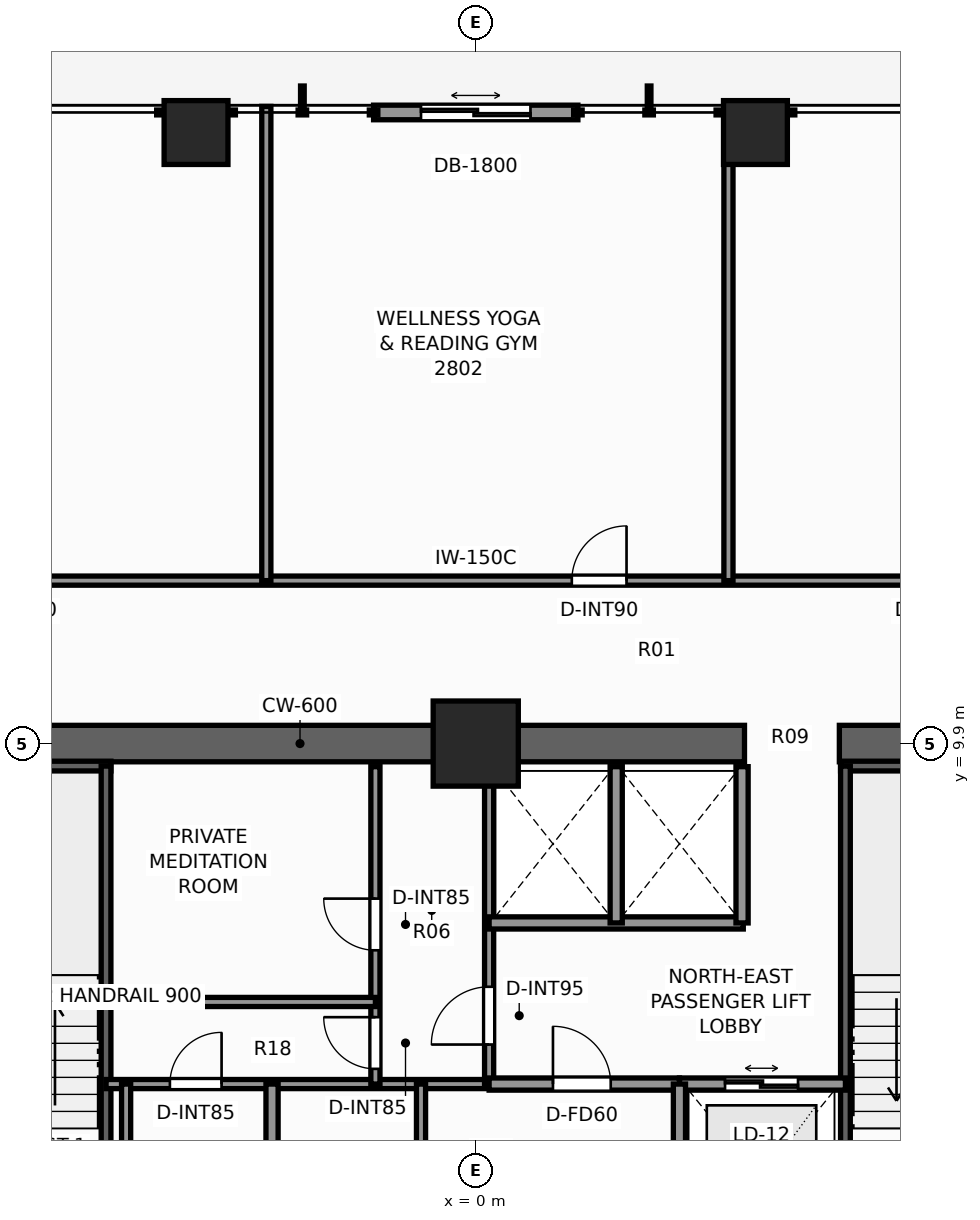
"""IFC4 building model, lengths in metres.
Left out: names, types, materials, properties, quantities, classifications, styles, units other than length and angle.
Written with IfcOpenShell. Run it as: python <this file> out.ifc"""

import sys

from ifc_helpers import new_model, si_unit, direction, frame, frame_2d, origin, origin_2d, place, context, subcontext, project, spatial, rectangle, extrude, element, fill, save


model = new_model("IFC4")
c1 = context("Model", 3, precision=1e-05, world=origin(), true_north=direction((0.0, 1.0)))
c2 = subcontext(c1, "Body", "Model", "MODEL_VIEW")
j1 = project(units=[si_unit("LENGTHUNIT", "METRE"), si_unit("PLANEANGLEUNIT", "RADIAN")], contexts=[c1])
p1 = place(None, origin())
s1 = spatial("IfcSite", under=j1, at=p1, CompositionType="ELEMENT")
p2 = place(p1, origin())
s2 = spatial("IfcBuilding", under=s1, at=p2, CompositionType="ELEMENT")
p3 = place(p2, frame((0.0, 0.0, 98.6)))
s3 = spatial("IfcBuildingStorey", under=s2, at=p3, CompositionType="ELEMENT", Elevation=98.6)
p4 = place(p3, frame((-10.2, 9.9, 0.0), z_axis=(0.0, 0.0, 1.0), x_axis=(1.0, 0.0, 0.0)))
e1 = element("IfcWall", 1, at=p4, inside=s3, PredefinedType="SHEAR", context=c2, shape_type="SweptSolid", body=[
    extrude(rectangle(XDim=14.62, YDim=0.6, at=frame_2d((7.31, 0.0))), origin(), (0.0, 0.0, 1.0), 3.3),
])
p5 = place(p3, frame((5.98, 9.9, 0.0), z_axis=(0.0, 0.0, 1.0), x_axis=(1.0, 0.0, 0.0)))
e2 = element("IfcWall", 2, at=p5, inside=s3, PredefinedType="SHEAR", context=c2, shape_type="SweptSolid", body=[
    extrude(rectangle(XDim=4.22, YDim=0.6, at=frame_2d((2.11, 0.0))), origin(), (0.0, 0.0, 1.0), 3.3),
])
p6 = place(p3, frame((0.0, 9.9, 0.0), z_axis=(0.0, 0.0, 1.0), x_axis=(1.0, 0.0, 0.0)))
e3 = element("IfcColumn", 3, at=p6, inside=s3, PredefinedType="COLUMN", context=c2, shape_type="SweptSolid", body=[
    extrude(rectangle(XDim=1.4, YDim=1.4, at=origin_2d()), origin(), (0.0, 0.0, 1.0), 3.3),
])
for number, where, z_axis, x_axis in (
    (4, (-4.6, 19.95, 0.0), (0.0, 0.0, 1.0), (1.0, 0.0, 0.0)),
    (5, (4.6, 19.95, 0.0), (0.0, 0.0, 1.0), (1.0, 0.0, 0.0)),
):
    element("IfcColumn", number, at=place(p3, frame(where, z_axis=z_axis, x_axis=x_axis)), inside=s3, PredefinedType="COLUMN", context=c2, shape_type="SweptSolid", body=[
        extrude(rectangle(XDim=1.05, YDim=1.05, at=origin_2d()), origin(), (0.0, 0.0, 1.0), 3.3),
    ])
p7 = place(p3, frame((-1.68, 20.28, 0.0), z_axis=(0.0, 0.0, 1.0), x_axis=(1.0, 0.0, 0.0)))
e6 = element("IfcWall", 6, at=p7, inside=s3, PredefinedType="STANDARD", context=c2, shape_type="SweptSolid", body=[
    extrude(rectangle(XDim=3.36, YDim=0.24, at=frame_2d((1.68, 0.0))), origin(), (0.0, 0.0, 1.0), 3.08),
])
p8 = place(p7, frame((0.78, 0.0, 0.0)))
e7 = element("IfcOpeningElement", 7, at=p8, cuts=e6, PredefinedType="OPENING", context=c2, shape_type="SweptSolid", body=[
    extrude(rectangle(XDim=1.8, YDim=2.2, at=frame_2d((0.9, 1.1))), frame((0.0, 0.13, 0.0), z_axis=(0.0, -1.0, 0.0), x_axis=(1.0, 0.0, 0.0)), (0.0, 0.0, 1.0), 0.26),
])
p9 = place(p3, frame((-9.52, 9.53, 0.0), z_axis=(0.0, 0.0, 1.0), x_axis=(1.0, 0.0, 0.0)))
e8 = element("IfcWall", 8, at=p9, inside=s3, PredefinedType="SHEAR", context=c2, shape_type="SweptSolid", body=[
    extrude(rectangle(XDim=3.52, YDim=0.16, at=frame_2d((1.76, 0.0))), origin(), (0.0, 0.0, 1.0), 3.3),
])
p10 = place(p3, frame((-6.08, 1.97, 0.0), z_axis=(0.0, 0.0, 1.0), x_axis=(0.0, 1.0, 0.0)))
e9 = element("IfcWall", 9, at=p10, inside=s3, PredefinedType="SHEAR", context=c2, shape_type="SweptSolid", body=[
    extrude(rectangle(XDim=7.56, YDim=0.16, at=frame_2d((3.78, 0.0))), origin(), (0.0, 0.0, 1.0), 3.3),
])
p11 = place(p3, frame((6.0, 9.53, 0.0), z_axis=(0.0, 0.0, 1.0), x_axis=(1.0, 0.0, 0.0)))
e10 = element("IfcWall", 10, at=p11, inside=s3, PredefinedType="SHEAR", context=c2, shape_type="SweptSolid", body=[
    extrude(rectangle(XDim=3.52, YDim=0.16, at=frame_2d((1.76, 0.0))), origin(), (0.0, 0.0, 1.0), 3.3),
])
p12 = place(p3, frame((6.08, 1.97, 0.0), z_axis=(0.0, 0.0, 1.0), x_axis=(0.0, 1.0, 0.0)))
e11 = element("IfcWall", 11, at=p12, inside=s3, PredefinedType="SHEAR", context=c2, shape_type="SweptSolid", body=[
    extrude(rectangle(XDim=7.56, YDim=0.16, at=frame_2d((3.78, 0.0))), origin(), (0.0, 0.0, 1.0), 3.3),
])
p13 = place(p3, frame((3.35, 4.3, 0.0), z_axis=(0.0, 0.0, 1.0), x_axis=(1.0, 0.0, 0.0)))
e12 = element("IfcWall", 12, at=p13, inside=s3, PredefinedType="SOLIDWALL", context=c2, shape_type="SweptSolid", body=[
    extrude(rectangle(XDim=2.73, YDim=0.2, at=frame_2d((1.365, 0.0))), origin(), (0.0, 0.0, 1.0), 3.08),
])
p14 = place(p13, frame((0.75, 0.0, 0.0)))
e13 = element("IfcOpeningElement", 13, at=p14, cuts=e12, PredefinedType="OPENING", context=c2, shape_type="SweptSolid", body=[
    extrude(rectangle(XDim=1.2, YDim=2.25, at=frame_2d((0.6, 1.125))), frame((0.0, 0.11, 0.0), z_axis=(0.0, -1.0, 0.0), x_axis=(1.0, 0.0, 0.0)), (0.0, 0.0, 1.0), 0.22),
])
p15 = place(p3, frame((-6.08, 4.3, 0.0), z_axis=(0.0, 0.0, 1.0), x_axis=(1.0, 0.0, 0.0)))
e14 = element("IfcWall", 14, at=p15, inside=s3, PredefinedType="PARTITIONING", context=c2, shape_type="SweptSolid", body=[
    extrude(rectangle(XDim=6.3, YDim=0.15, at=frame_2d((3.15, 0.0))), origin(), (0.0, 0.0, 1.0), 3.08),
])
p16 = place(p15, frame((1.05, 0.0, 0.0)))
e15 = element("IfcOpeningElement", 15, at=p16, cuts=e14, PredefinedType="OPENING", context=c2, shape_type="SweptSolid", body=[
    extrude(rectangle(XDim=0.85, YDim=2.03, at=frame_2d((0.425, 1.015))), frame((0.0, 0.085, 0.0), z_axis=(0.0, -1.0, 0.0), x_axis=(1.0, 0.0, 0.0)), (0.0, 0.0, 1.0), 0.17),
])
p17 = place(p3, frame((0.22, 4.3, 0.0), z_axis=(0.0, 0.0, 1.0), x_axis=(0.0, 1.0, 0.0)))
e16 = element("IfcWall", 16, at=p17, inside=s3, PredefinedType="PARTITIONING", context=c2, shape_type="SweptSolid", body=[
    extrude(rectangle(XDim=5.22, YDim=0.15, at=frame_2d((2.61, 0.0))), origin(), (0.0, 0.0, 1.0), 3.08),
])
p18 = place(p17, frame((0.65, 0.0, 0.0)))
e17 = element("IfcOpeningElement", 17, at=p18, cuts=e16, PredefinedType="OPENING", context=c2, shape_type="SweptSolid", body=[
    extrude(rectangle(XDim=0.95, YDim=2.06, at=frame_2d((0.475, 1.03))), frame((0.0, 0.085, 0.0), z_axis=(0.0, -1.0, 0.0), x_axis=(1.0, 0.0, 0.0)), (0.0, 0.0, 1.0), 0.17),
])
p19 = place(p3, frame((-1.65, 4.3, 0.0), z_axis=(0.0, 0.0, 1.0), x_axis=(0.0, 1.0, 0.0)))
e18 = element("IfcWall", 18, at=p19, inside=s3, PredefinedType="PARTITIONING", context=c2, shape_type="SweptSolid", body=[
    extrude(rectangle(XDim=5.22, YDim=0.15, at=frame_2d((2.61, 0.0))), origin(), (0.0, 0.0, 1.0), 3.08),
])
p20 = place(p19, frame((2.2, 0.0, 0.0)))
e19 = element("IfcOpeningElement", 19, at=p20, cuts=e18, PredefinedType="OPENING", context=c2, shape_type="SweptSolid", body=[
    extrude(rectangle(XDim=0.85, YDim=2.03, at=frame_2d((0.425, 1.015))), frame((0.0, 0.085, 0.0), z_axis=(0.0, -1.0, 0.0), x_axis=(1.0, 0.0, 0.0)), (0.0, 0.0, 1.0), 0.17),
])
p21 = place(p19, frame((0.25, 0.0, 0.0)))
e20 = element("IfcOpeningElement", 20, at=p21, cuts=e18, PredefinedType="OPENING", context=c2, shape_type="SweptSolid", body=[
    extrude(rectangle(XDim=0.85, YDim=2.03, at=frame_2d((0.425, 1.015))), frame((0.0, 0.085, 0.0), z_axis=(0.0, -1.0, 0.0), x_axis=(1.0, 0.0, 0.0)), (0.0, 0.0, 1.0), 0.17),
])
p22 = place(p3, frame((-6.08, 5.65, 0.0), z_axis=(0.0, 0.0, 1.0), x_axis=(1.0, 0.0, 0.0)))
e21 = element("IfcWall", 21, at=p22, inside=s3, PredefinedType="PARTITIONING", context=c2, shape_type="SweptSolid", body=[
    extrude(rectangle(XDim=4.43, YDim=0.15, at=frame_2d((2.215, 0.0))), origin(), (0.0, 0.0, 1.0), 3.08),
])
p23 = place(p3, frame((0.22, 6.95, 0.0), z_axis=(0.0, 0.0, 1.0), x_axis=(1.0, 0.0, 0.0)))
e22 = element("IfcWall", 22, at=p23, inside=s3, PredefinedType="SOLIDWALL", context=c2, shape_type="SweptSolid", body=[
    extrude(rectangle(XDim=4.18, YDim=0.2, at=frame_2d((2.09, 0.0))), origin(), (0.0, 0.0, 1.0), 3.08),
])
for number, where, z_axis, x_axis in (
    (23, (4.38, 6.95, 0.0), (0.0, 0.0, 1.0), (0.0, 1.0, 0.0)),
    (24, (2.31, 6.95, 0.0), (0.0, 0.0, 1.0), (0.0, 1.0, 0.0)),
):
    element("IfcWall", number, at=place(p3, frame(where, z_axis=z_axis, x_axis=x_axis)), inside=s3, PredefinedType="SOLIDWALL", context=c2, shape_type="SweptSolid", body=[
        extrude(rectangle(XDim=2.57, YDim=0.2, at=frame_2d((1.285, 0.0))), origin(), (0.0, 0.0, 1.0), 3.08),
    ])
p24 = place(p3, frame((0.22, 4.3, 0.0), z_axis=(0.0, 0.0, 1.0), x_axis=(1.0, 0.0, 0.0)))
e25 = element("IfcWall", 25, at=p24, inside=s3, PredefinedType="SOLIDWALL", context=c2, shape_type="SweptSolid", body=[
    extrude(rectangle(XDim=3.13, YDim=0.2, at=frame_2d((1.565, 0.0))), origin(), (0.0, 0.0, 1.0), 3.08),
])
p25 = place(p24, frame((1.05, 0.0, 0.0)))
e26 = element("IfcOpeningElement", 26, at=p25, cuts=e25, PredefinedType="OPENING", context=c2, shape_type="SweptSolid", body=[
    extrude(rectangle(XDim=0.95, YDim=2.06, at=frame_2d((0.475, 1.03))), frame((0.0, 0.11, 0.0), z_axis=(0.0, -1.0, 0.0), x_axis=(1.0, 0.0, 0.0)), (0.0, 0.0, 1.0), 0.22),
])
for number, where, z_axis, x_axis in (
    (27, (-3.35, 1.1, 0.0), (0.0, 0.0, 1.0), (0.0, 1.0, 0.0)),
    (28, (3.35, 1.1, 0.0), (0.0, 0.0, 1.0), (0.0, 1.0, 0.0)),
):
    element("IfcWall", number, at=place(p3, frame(where, z_axis=z_axis, x_axis=x_axis)), inside=s3, PredefinedType="SOLIDWALL", context=c2, shape_type="SweptSolid", body=[
        extrude(rectangle(XDim=3.2, YDim=0.2, at=frame_2d((1.6, 0.0))), origin(), (0.0, 0.0, 1.0), 3.08),
    ])
p26 = place(p3, frame((-0.9, 1.05, 0.0), z_axis=(0.0, 0.0, 1.0), x_axis=(0.0, 1.0, 0.0)))
e29 = element("IfcWall", 29, at=p26, inside=s3, PredefinedType="PARTITIONING", context=c2, shape_type="SweptSolid", body=[
    extrude(rectangle(XDim=3.25, YDim=0.15, at=frame_2d((1.625, 0.0))), origin(), (0.0, 0.0, 1.0), 3.08),
])
p27 = place(p26, frame((1.1, 0.0, 0.0)))
e30 = element("IfcOpeningElement", 30, at=p27, cuts=e29, PredefinedType="OPENING", context=c2, shape_type="SweptSolid", body=[
    extrude(rectangle(XDim=0.85, YDim=2.03, at=frame_2d((0.425, 1.015))), frame((0.0, 0.085, 0.0), z_axis=(0.0, -1.0, 0.0), x_axis=(1.0, 0.0, 0.0)), (0.0, 0.0, 1.0), 0.17),
])
p28 = place(p3, frame((-5.75, 1.97, 0.0), z_axis=(0.0, 0.0, 1.0), x_axis=(0.0, 1.0, 0.0)))
e31 = element("IfcWall", 31, at=p28, inside=s3, PredefinedType="PARTITIONING", context=c2, shape_type="SweptSolid", body=[
    extrude(rectangle(XDim=2.33, YDim=0.15, at=frame_2d((1.165, 0.0))), origin(), (0.0, 0.0, 1.0), 3.08),
])
p29 = place(p3, frame((-12.26, 12.58, 0.0), z_axis=(0.0, 0.0, 1.0), x_axis=(1.0, 0.0, 0.0)))
e32 = element("IfcWall", 32, at=p29, inside=s3, PredefinedType="PARTITIONING", context=c2, shape_type="SweptSolid", body=[
    extrude(rectangle(XDim=24.52, YDim=0.15, at=frame_2d((12.26, 0.0))), origin(), (0.0, 0.0, 1.0), 2.292),
])
p30 = place(p29, frame((4.275, 0.0, 0.0)))
e33 = element("IfcOpeningElement", 33, at=p30, cuts=e32, PredefinedType="OPENING", context=c2, shape_type="SweptSolid", body=[
    extrude(rectangle(XDim=0.9, YDim=2.06, at=frame_2d((0.45, 1.03))), frame((0.0, 0.085, 0.0), z_axis=(0.0, -1.0, 0.0), x_axis=(1.0, 0.0, 0.0)), (0.0, 0.0, 1.0), 0.17),
])
p31 = place(p29, frame((13.84, 0.0, 0.0)))
e34 = element("IfcOpeningElement", 34, at=p31, cuts=e32, PredefinedType="OPENING", context=c2, shape_type="SweptSolid", body=[
    extrude(rectangle(XDim=0.9, YDim=2.06, at=frame_2d((0.45, 1.03))), frame((0.0, 0.085, 0.0), z_axis=(0.0, -1.0, 0.0), x_axis=(1.0, 0.0, 0.0)), (0.0, 0.0, 1.0), 0.17),
])
p32 = place(p29, frame((19.345, 0.0, 0.0)))
e35 = element("IfcOpeningElement", 35, at=p32, cuts=e32, PredefinedType="OPENING", context=c2, shape_type="SweptSolid", body=[
    extrude(rectangle(XDim=0.9, YDim=2.06, at=frame_2d((0.45, 1.03))), frame((0.0, 0.085, 0.0), z_axis=(0.0, -1.0, 0.0), x_axis=(1.0, 0.0, 0.0)), (0.0, 0.0, 1.0), 0.17),
])
for number, where, z_axis, x_axis in (
    (36, (-3.444, 12.58, 0.0), (0.0, 0.0, 1.0), (0.0, 1.0, 0.0)),
    (37, (4.156, 12.58, 0.0), (0.0, 0.0, 1.0), (0.0, 1.0, 0.0)),
):
    element("IfcWall", number, at=place(p3, frame(where, z_axis=z_axis, x_axis=x_axis)), inside=s3, PredefinedType="PARTITIONING", context=c2, shape_type="SweptSolid", body=[
        extrude(rectangle(XDim=7.8, YDim=0.15, at=frame_2d((3.9, 0.0))), origin(), (0.0, 0.0, 1.0), 2.449),
    ])
p33 = place(p8, origin())
e38 = element("IfcDoor", 38, at=p33, inside=s3, OperationType="DOUBLE_DOOR_SLIDING", PredefinedType="DOOR", context=c2, shape_type="SweptSolid", body=[
    extrude(rectangle(XDim=1.8, YDim=2.2, at=frame_2d((0.9, 1.1))), frame((0.0, 0.025, 0.0), z_axis=(0.0, -1.0, 0.0), x_axis=(1.0, 0.0, 0.0)), (0.0, 0.0, 1.0), 0.05),
])
fill(e7, e38)
p34 = place(p14, origin())
e39 = element("IfcDoor", 39, at=p34, inside=s3, OperationType="DOUBLE_DOOR_SLIDING", PredefinedType="DOOR", context=c2, shape_type="SweptSolid", body=[
    extrude(rectangle(XDim=1.2, YDim=2.25, at=frame_2d((0.6, 1.125))), frame((0.0, 0.025, 0.0), z_axis=(0.0, -1.0, 0.0), x_axis=(1.0, 0.0, 0.0)), (0.0, 0.0, 1.0), 0.05),
])
fill(e13, e39)
p35 = place(p18, origin())
e40 = element("IfcDoor", 40, at=p35, inside=s3, OperationType="SINGLE_SWING_LEFT", PredefinedType="DOOR", context=c2, shape_type="SweptSolid", body=[
    extrude(rectangle(XDim=0.95, YDim=2.06, at=frame_2d((0.475, 1.03))), frame((0.0, 0.025, 0.0), z_axis=(0.0, -1.0, 0.0), x_axis=(1.0, 0.0, 0.0)), (0.0, 0.0, 1.0), 0.05),
])
fill(e17, e40)
p36 = place(p20, origin())
e41 = element("IfcDoor", 41, at=p36, inside=s3, OperationType="SINGLE_SWING_RIGHT", PredefinedType="DOOR", context=c2, shape_type="SweptSolid", body=[
    extrude(rectangle(XDim=0.85, YDim=2.03, at=frame_2d((0.425, 1.015))), frame((0.0, 0.025, 0.0), z_axis=(0.0, -1.0, 0.0), x_axis=(1.0, 0.0, 0.0)), (0.0, 0.0, 1.0), 0.05),
])
fill(e19, e41)
p37 = place(p21, origin())
e42 = element("IfcDoor", 42, at=p37, inside=s3, OperationType="SINGLE_SWING_RIGHT", PredefinedType="DOOR", context=c2, shape_type="SweptSolid", body=[
    extrude(rectangle(XDim=0.85, YDim=2.03, at=frame_2d((0.425, 1.015))), frame((0.0, 0.025, 0.0), z_axis=(0.0, -1.0, 0.0), x_axis=(1.0, 0.0, 0.0)), (0.0, 0.0, 1.0), 0.05),
])
fill(e20, e42)
p38 = place(p25, origin())
e43 = element("IfcDoor", 43, at=p38, inside=s3, OperationType="SINGLE_SWING_LEFT", PredefinedType="DOOR", context=c2, shape_type="SweptSolid", body=[
    extrude(rectangle(XDim=0.95, YDim=2.06, at=frame_2d((0.475, 1.03))), frame((0.0, 0.025, 0.0), z_axis=(0.0, -1.0, 0.0), x_axis=(1.0, 0.0, 0.0)), (0.0, 0.0, 1.0), 0.05),
])
fill(e26, e43)
p39 = place(p16, origin())
e44 = element("IfcDoor", 44, at=p39, inside=s3, OperationType="SINGLE_SWING_RIGHT", PredefinedType="DOOR", context=c2, shape_type="SweptSolid", body=[
    extrude(rectangle(XDim=0.85, YDim=2.03, at=frame_2d((0.425, 1.015))), frame((0.0, 0.025, 0.0), z_axis=(0.0, -1.0, 0.0), x_axis=(1.0, 0.0, 0.0)), (0.0, 0.0, 1.0), 0.05),
])
fill(e15, e44)
p40 = place(p31, origin())
e45 = element("IfcDoor", 45, at=p40, inside=s3, OperationType="SINGLE_SWING_RIGHT", PredefinedType="DOOR", context=c2, shape_type="SweptSolid", body=[
    extrude(rectangle(XDim=0.9, YDim=2.06, at=frame_2d((0.45, 1.03))), frame((0.0, 0.025, 0.0), z_axis=(0.0, -1.0, 0.0), x_axis=(1.0, 0.0, 0.0)), (0.0, 0.0, 1.0), 0.05),
])
fill(e34, e45)
save(model, sys.argv[1])
